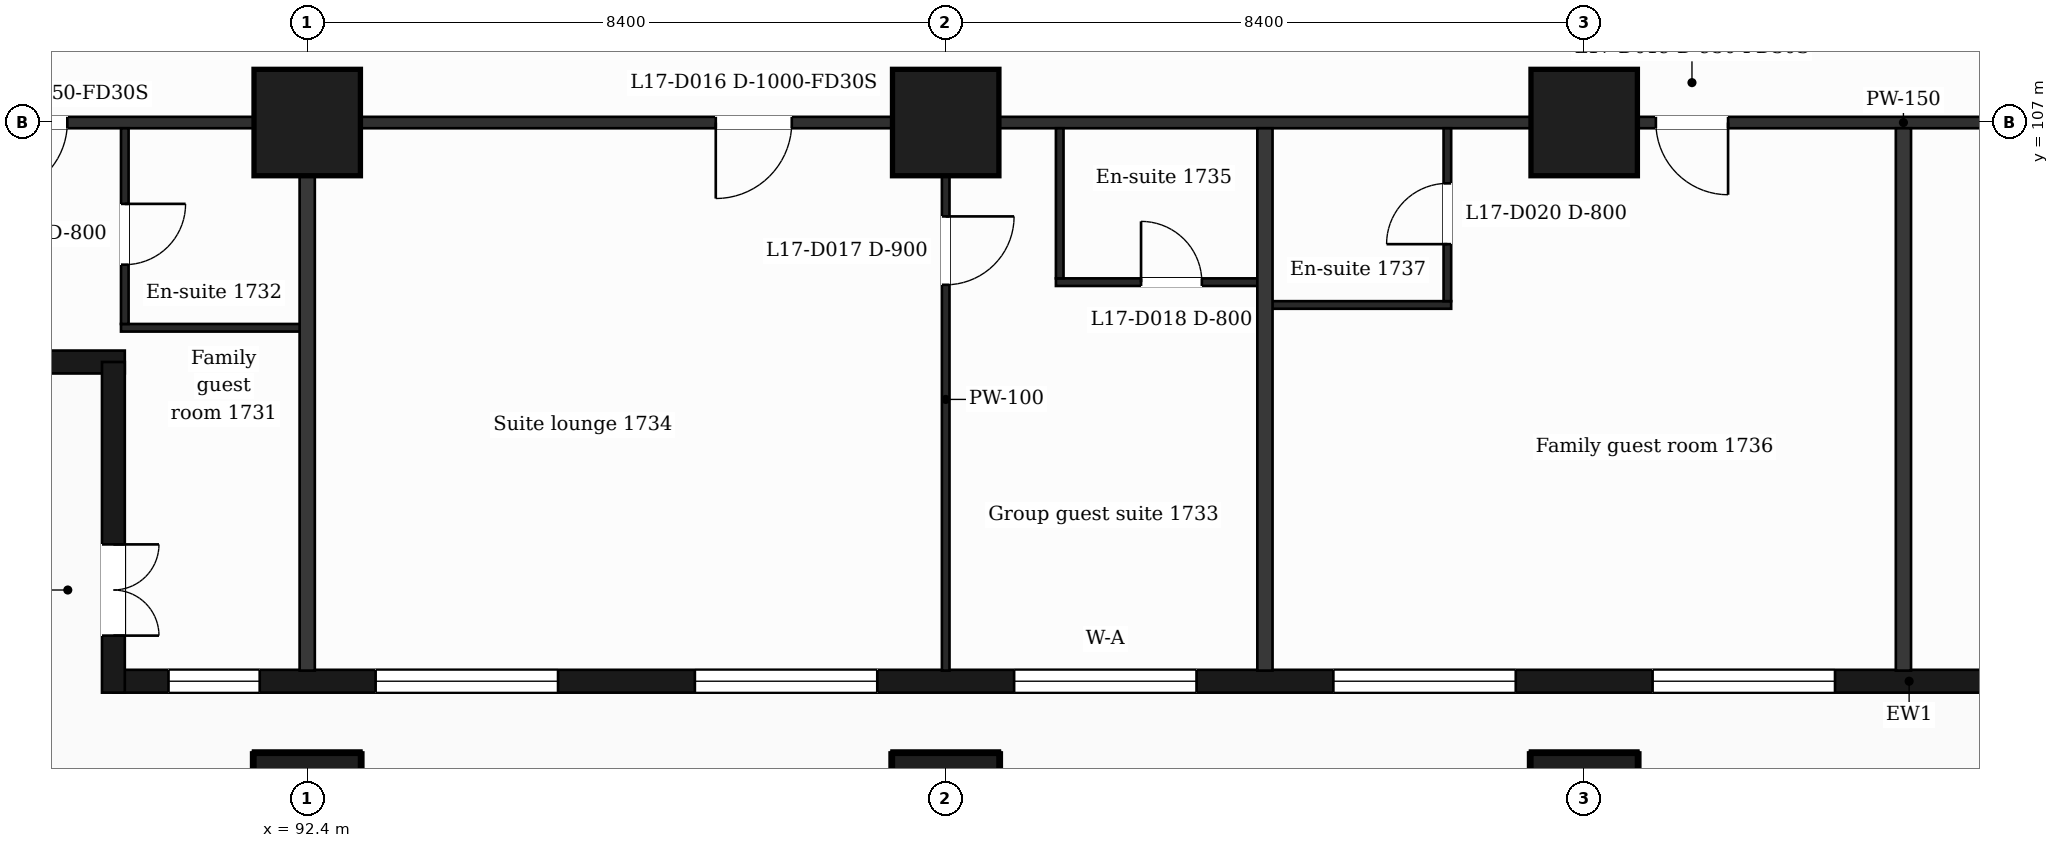
"""IFC4 building model, lengths in metres.
Left out: names, types, materials, properties, quantities, classifications, styles, units other than length and angle.
Written with IfcOpenShell. Run it as: python <this file> out.ifc"""

import sys

from ifc_helpers import new_model, si_unit, direction, frame, frame_2d, origin, origin_2d, place, context, subcontext, project, spatial, rectangle, extrude, element, fill, save


model = new_model("IFC4")
c1 = context("Model", 3, precision=1e-05, world=origin(), true_north=direction((0.0, 1.0)))
c2 = subcontext(c1, "Body", "Model", "MODEL_VIEW")
j1 = project(units=[si_unit("LENGTHUNIT", "METRE"), si_unit("PLANEANGLEUNIT", "RADIAN")], contexts=[c1])
p1 = place(None, origin())
s1 = spatial("IfcSite", under=j1, at=p1, CompositionType="ELEMENT")
p2 = place(p1, origin())
s2 = spatial("IfcBuilding", under=s1, at=p2, CompositionType="ELEMENT")
p3 = place(p2, frame((0.0, 0.0, 77.5)))
s3 = spatial("IfcBuildingStorey", under=s2, at=p3, CompositionType="ELEMENT", Elevation=77.5)
for number, where, z_axis, x_axis in (
    (1, (92.4, 98.0, 0.0), (0.0, 0.0, 1.0), (1.0, 0.0, 0.0)),
    (2, (100.8, 98.0, 0.0), (0.0, 0.0, 1.0), (1.0, 0.0, 0.0)),
    (3, (109.2, 98.0, 0.0), (0.0, 0.0, 1.0), (1.0, 0.0, 0.0)),
    (4, (92.4, 107.0, 0.0), (0.0, 0.0, 1.0), (1.0, 0.0, 0.0)),
    (5, (100.8, 107.0, 0.0), (0.0, 0.0, 1.0), (1.0, 0.0, 0.0)),
    (6, (109.2, 107.0, 0.0), (0.0, 0.0, 1.0), (1.0, 0.0, 0.0)),
):
    element("IfcColumn", number, at=place(p3, frame(where, z_axis=z_axis, x_axis=x_axis)), inside=s3, PredefinedType="COLUMN", context=c2, shape_type="SweptSolid", body=[
        extrude(rectangle(XDim=1.4, YDim=1.4, at=origin_2d()), origin(), (0.0, 0.0, 1.0), 3.5),
    ])
p4 = place(p3, frame((89.85, 99.65, 0.0), z_axis=(0.0, 0.0, 1.0), x_axis=(1.0, 0.0, 0.0)))
e7 = element("IfcWall", 7, at=p4, inside=s3, PredefinedType="SOLIDWALL", context=c2, shape_type="SweptSolid", body=[
    extrude(rectangle(XDim=47.25, YDim=0.3, at=frame_2d((23.625, 0.0))), origin(), (0.0, 0.0, 1.0), 3.0),
])
p5 = place(p4, frame((0.725, 0.0, 0.9)))
e8 = element("IfcOpeningElement", 8, at=p5, cuts=e7, PredefinedType="OPENING", context=c2, shape_type="SweptSolid", body=[
    extrude(rectangle(XDim=1.2, YDim=2.1, at=frame_2d((0.6, 1.05))), frame((0.0, 0.16, 0.0), z_axis=(0.0, -1.0, 0.0), x_axis=(1.0, 0.0, 0.0)), (0.0, 0.0, 1.0), 0.32),
])
p6 = place(p4, frame((3.45, 0.0, 0.9)))
e9 = element("IfcOpeningElement", 9, at=p6, cuts=e7, PredefinedType="OPENING", context=c2, shape_type="SweptSolid", body=[
    extrude(rectangle(XDim=2.4, YDim=2.1, at=frame_2d((1.2, 1.05))), frame((0.0, 0.16, 0.0), z_axis=(0.0, -1.0, 0.0), x_axis=(1.0, 0.0, 0.0)), (0.0, 0.0, 1.0), 0.32),
])
p7 = place(p4, frame((7.65, 0.0, 0.9)))
e10 = element("IfcOpeningElement", 10, at=p7, cuts=e7, PredefinedType="OPENING", context=c2, shape_type="SweptSolid", body=[
    extrude(rectangle(XDim=2.4, YDim=2.1, at=frame_2d((1.2, 1.05))), frame((0.0, 0.16, 0.0), z_axis=(0.0, -1.0, 0.0), x_axis=(1.0, 0.0, 0.0)), (0.0, 0.0, 1.0), 0.32),
])
p8 = place(p4, frame((11.85, 0.0, 0.9)))
e11 = element("IfcOpeningElement", 11, at=p8, cuts=e7, PredefinedType="OPENING", context=c2, shape_type="SweptSolid", body=[
    extrude(rectangle(XDim=2.4, YDim=2.1, at=frame_2d((1.2, 1.05))), frame((0.0, 0.16, 0.0), z_axis=(0.0, -1.0, 0.0), x_axis=(1.0, 0.0, 0.0)), (0.0, 0.0, 1.0), 0.32),
])
p9 = place(p4, frame((16.05, 0.0, 0.9)))
e12 = element("IfcOpeningElement", 12, at=p9, cuts=e7, PredefinedType="OPENING", context=c2, shape_type="SweptSolid", body=[
    extrude(rectangle(XDim=2.4, YDim=2.1, at=frame_2d((1.2, 1.05))), frame((0.0, 0.16, 0.0), z_axis=(0.0, -1.0, 0.0), x_axis=(1.0, 0.0, 0.0)), (0.0, 0.0, 1.0), 0.32),
])
p10 = place(p4, frame((20.25, 0.0, 0.9)))
e13 = element("IfcOpeningElement", 13, at=p10, cuts=e7, PredefinedType="OPENING", context=c2, shape_type="SweptSolid", body=[
    extrude(rectangle(XDim=2.4, YDim=2.1, at=frame_2d((1.2, 1.05))), frame((0.0, 0.16, 0.0), z_axis=(0.0, -1.0, 0.0), x_axis=(1.0, 0.0, 0.0)), (0.0, 0.0, 1.0), 0.32),
])
p11 = place(p4, frame((25.05, 0.0, 0.9)))
e14 = element("IfcOpeningElement", 14, at=p11, cuts=e7, PredefinedType="OPENING", context=c2, shape_type="SweptSolid", body=[
    extrude(rectangle(XDim=1.2, YDim=2.1, at=frame_2d((0.6, 1.05))), frame((0.0, 0.16, 0.0), z_axis=(0.0, -1.0, 0.0), x_axis=(1.0, 0.0, 0.0)), (0.0, 0.0, 1.0), 0.32),
])
p12 = place(p4, frame((29.25, 0.0, 0.9)))
e15 = element("IfcOpeningElement", 15, at=p12, cuts=e7, PredefinedType="OPENING", context=c2, shape_type="SweptSolid", body=[
    extrude(rectangle(XDim=1.2, YDim=2.1, at=frame_2d((0.6, 1.05))), frame((0.0, 0.16, 0.0), z_axis=(0.0, -1.0, 0.0), x_axis=(1.0, 0.0, 0.0)), (0.0, 0.0, 1.0), 0.32),
])
p13 = place(p4, frame((32.55, 0.0, 0.0)))
e16 = element("IfcOpeningElement", 16, at=p13, cuts=e7, PredefinedType="OPENING", context=c2, shape_type="SweptSolid", body=[
    extrude(rectangle(XDim=1.2, YDim=2.4, at=frame_2d((0.6, 1.2))), frame((0.0, 0.16, 0.0), z_axis=(0.0, -1.0, 0.0), x_axis=(1.0, 0.0, 0.0)), (0.0, 0.0, 1.0), 0.32),
])
p14 = place(p4, frame((34.35, 0.0, 0.9)))
e17 = element("IfcOpeningElement", 17, at=p14, cuts=e7, PredefinedType="OPENING", context=c2, shape_type="SweptSolid", body=[
    extrude(rectangle(XDim=1.2, YDim=2.1, at=frame_2d((0.6, 1.05))), frame((0.0, 0.16, 0.0), z_axis=(0.0, -1.0, 0.0), x_axis=(1.0, 0.0, 0.0)), (0.0, 0.0, 1.0), 0.32),
])
p15 = place(p4, frame((37.05, 0.0, 0.9)))
e18 = element("IfcOpeningElement", 18, at=p15, cuts=e7, PredefinedType="OPENING", context=c2, shape_type="SweptSolid", body=[
    extrude(rectangle(XDim=2.4, YDim=2.1, at=frame_2d((1.2, 1.05))), frame((0.0, 0.16, 0.0), z_axis=(0.0, -1.0, 0.0), x_axis=(1.0, 0.0, 0.0)), (0.0, 0.0, 1.0), 0.32),
])
p16 = place(p4, frame((40.95, 0.0, 0.0)))
e19 = element("IfcOpeningElement", 19, at=p16, cuts=e7, PredefinedType="OPENING", context=c2, shape_type="SweptSolid", body=[
    extrude(rectangle(XDim=1.2, YDim=2.4, at=frame_2d((0.6, 1.2))), frame((0.0, 0.16, 0.0), z_axis=(0.0, -1.0, 0.0), x_axis=(1.0, 0.0, 0.0)), (0.0, 0.0, 1.0), 0.32),
])
p17 = place(p4, frame((42.75, 0.0, 0.9)))
e20 = element("IfcOpeningElement", 20, at=p17, cuts=e7, PredefinedType="OPENING", context=c2, shape_type="SweptSolid", body=[
    extrude(rectangle(XDim=1.2, YDim=2.1, at=frame_2d((0.6, 1.05))), frame((0.0, 0.16, 0.0), z_axis=(0.0, -1.0, 0.0), x_axis=(1.0, 0.0, 0.0)), (0.0, 0.0, 1.0), 0.32),
])
p18 = place(p4, frame((45.25, 0.0, 0.9)))
e21 = element("IfcOpeningElement", 21, at=p18, cuts=e7, PredefinedType="OPENING", context=c2, shape_type="SweptSolid", body=[
    extrude(rectangle(XDim=1.2, YDim=2.1, at=frame_2d((0.6, 1.05))), frame((0.0, 0.16, 0.0), z_axis=(0.0, -1.0, 0.0), x_axis=(1.0, 0.0, 0.0)), (0.0, 0.0, 1.0), 0.32),
])
p19 = place(p3, frame((86.452, 103.85, 0.0), z_axis=(0.0, 0.0, 1.0), x_axis=(1.0, 0.0, 0.0)))
e22 = element("IfcWall", 22, at=p19, inside=s3, PredefinedType="SOLIDWALL", context=c2, shape_type="SweptSolid", body=[
    extrude(rectangle(XDim=3.548, YDim=0.3, at=frame_2d((1.774, 0.0))), origin(), (0.0, 0.0, 1.0), 3.0),
])
p20 = place(p3, frame((89.85, 103.85, 0.0), z_axis=(0.0, 0.0, 1.0), x_axis=(0.0, -1.0, 0.0)))
e23 = element("IfcWall", 23, at=p20, inside=s3, PredefinedType="SOLIDWALL", context=c2, shape_type="SweptSolid", body=[
    extrude(rectangle(XDim=4.35, YDim=0.3, at=frame_2d((2.175, 0.0))), origin(), (0.0, 0.0, 1.0), 3.0),
])
p21 = place(p20, frame((2.4, 0.0, 0.0)))
e24 = element("IfcOpeningElement", 24, at=p21, cuts=e23, PredefinedType="OPENING", context=c2, shape_type="SweptSolid", body=[
    extrude(rectangle(XDim=1.2, YDim=2.4, at=frame_2d((0.6, 1.2))), frame((0.0, 0.16, 0.0), z_axis=(0.0, -1.0, 0.0), x_axis=(1.0, 0.0, 0.0)), (0.0, 0.0, 1.0), 0.32),
])
for number, where, z_axis, x_axis in (
    (25, (89.95, 104.3, 0.0), (0.0, 0.0, 1.0), (1.0, 0.0, 0.0)),
    (26, (105.0, 104.6, 0.0), (0.0, 0.0, 1.0), (1.0, 0.0, 0.0)),
):
    element("IfcWall", number, at=place(p3, frame(where, z_axis=z_axis, x_axis=x_axis)), inside=s3, PredefinedType="PARTITIONING", context=c2, shape_type="SweptSolid", body=[
        extrude(rectangle(XDim=2.45, YDim=0.1, at=frame_2d((1.225, 0.0))), origin(), (0.0, 0.0, 1.0), 3.0),
    ])
p22 = place(p3, frame((102.25, 104.9, 0.0), z_axis=(0.0, 0.0, 1.0), x_axis=(1.0, 0.0, 0.0)))
e27 = element("IfcWall", 27, at=p22, inside=s3, PredefinedType="PARTITIONING", context=c2, shape_type="SweptSolid", body=[
    extrude(rectangle(XDim=2.75, YDim=0.1, at=frame_2d((1.375, 0.0))), origin(), (0.0, 0.0, 1.0), 3.0),
])
p23 = place(p22, frame((1.12, 0.0, 0.0)))
e28 = element("IfcOpeningElement", 28, at=p23, cuts=e27, PredefinedType="OPENING", context=c2, shape_type="SweptSolid", body=[
    extrude(rectangle(XDim=0.8, YDim=2.1, at=frame_2d((0.4, 1.05))), frame((0.0, 0.06, 0.0), z_axis=(0.0, -1.0, 0.0), x_axis=(1.0, 0.0, 0.0)), (0.0, 0.0, 1.0), 0.12),
])
p24 = place(p3, frame((87.018, 107.0, 0.0), z_axis=(0.0, 0.0, 1.0), x_axis=(1.0, 0.0, 0.0)))
e29 = element("IfcWall", 29, at=p24, inside=s3, PredefinedType="PARTITIONING", context=c2, shape_type="SweptSolid", body=[
    extrude(rectangle(XDim=52.765, YDim=0.15, at=frame_2d((26.382, 0.0))), origin(), (0.0, 0.0, 1.0), 3.0),
])
p25 = place(p24, frame((1.276, 0.0, 0.0)))
e30 = element("IfcOpeningElement", 30, at=p25, cuts=e29, PredefinedType="OPENING", context=c2, shape_type="SweptSolid", body=[
    extrude(rectangle(XDim=0.95, YDim=2.1, at=frame_2d((0.475, 1.05))), frame((0.0, 0.085, 0.0), z_axis=(0.0, -1.0, 0.0), x_axis=(1.0, 0.0, 0.0)), (0.0, 0.0, 1.0), 0.17),
])
p26 = place(p24, frame((10.757, 0.0, 0.0)))
e31 = element("IfcOpeningElement", 31, at=p26, cuts=e29, PredefinedType="OPENING", context=c2, shape_type="SweptSolid", body=[
    extrude(rectangle(XDim=1.0, YDim=2.1, at=frame_2d((0.5, 1.05))), frame((0.0, 0.085, 0.0), z_axis=(0.0, -1.0, 0.0), x_axis=(1.0, 0.0, 0.0)), (0.0, 0.0, 1.0), 0.17),
])
p27 = place(p24, frame((23.125, 0.0, 0.0)))
e32 = element("IfcOpeningElement", 32, at=p27, cuts=e29, PredefinedType="OPENING", context=c2, shape_type="SweptSolid", body=[
    extrude(rectangle(XDim=0.95, YDim=2.1, at=frame_2d((0.475, 1.05))), frame((0.0, 0.085, 0.0), z_axis=(0.0, -1.0, 0.0), x_axis=(1.0, 0.0, 0.0)), (0.0, 0.0, 1.0), 0.17),
])
p28 = place(p24, frame((31.757, 0.0, 0.0)))
e33 = element("IfcOpeningElement", 33, at=p28, cuts=e29, PredefinedType="OPENING", context=c2, shape_type="SweptSolid", body=[
    extrude(rectangle(XDim=1.0, YDim=2.1, at=frame_2d((0.5, 1.05))), frame((0.0, 0.085, 0.0), z_axis=(0.0, -1.0, 0.0), x_axis=(1.0, 0.0, 0.0)), (0.0, 0.0, 1.0), 0.17),
])
p29 = place(p24, frame((42.819, 0.0, 0.0)))
e34 = element("IfcOpeningElement", 34, at=p29, cuts=e29, PredefinedType="OPENING", context=c2, shape_type="SweptSolid", body=[
    extrude(rectangle(XDim=0.95, YDim=2.1, at=frame_2d((0.475, 1.05))), frame((0.0, 0.085, 0.0), z_axis=(0.0, -1.0, 0.0), x_axis=(1.0, 0.0, 0.0)), (0.0, 0.0, 1.0), 0.17),
])
p30 = place(p24, frame((48.974, 0.0, 0.0)))
e35 = element("IfcOpeningElement", 35, at=p30, cuts=e29, PredefinedType="OPENING", context=c2, shape_type="SweptSolid", body=[
    extrude(rectangle(XDim=0.95, YDim=2.1, at=frame_2d((0.475, 1.05))), frame((0.0, 0.085, 0.0), z_axis=(0.0, -1.0, 0.0), x_axis=(1.0, 0.0, 0.0)), (0.0, 0.0, 1.0), 0.17),
])
p31 = place(p3, frame((90.0, 104.35, 0.0), z_axis=(0.0, 0.0, 1.0), x_axis=(0.0, 1.0, 0.0)))
e36 = element("IfcWall", 36, at=p31, inside=s3, PredefinedType="PARTITIONING", context=c2, shape_type="SweptSolid", body=[
    extrude(rectangle(XDim=2.575, YDim=0.1, at=frame_2d((1.288, 0.0))), origin(), (0.0, 0.0, 1.0), 3.0),
])
p32 = place(p31, frame((0.78, 0.0, 0.0)))
e37 = element("IfcOpeningElement", 37, at=p32, cuts=e36, PredefinedType="OPENING", context=c2, shape_type="SweptSolid", body=[
    extrude(rectangle(XDim=0.8, YDim=2.1, at=frame_2d((0.4, 1.05))), frame((0.0, 0.06, 0.0), z_axis=(0.0, -1.0, 0.0), x_axis=(1.0, 0.0, 0.0)), (0.0, 0.0, 1.0), 0.12),
])
p33 = place(p3, frame((92.4, 99.79, 0.0), z_axis=(0.0, 0.0, 1.0), x_axis=(0.0, 1.0, 0.0)))
e38 = element("IfcWall", 38, at=p33, inside=s3, PredefinedType="PARTITIONING", context=c2, shape_type="SweptSolid", body=[
    extrude(rectangle(XDim=7.135, YDim=0.2, at=frame_2d((3.567, 0.0))), origin(), (0.0, 0.0, 1.0), 3.0),
])
p34 = place(p3, frame((100.8, 99.79, 0.0), z_axis=(0.0, 0.0, 1.0), x_axis=(0.0, 1.0, 0.0)))
e39 = element("IfcWall", 39, at=p34, inside=s3, PredefinedType="PARTITIONING", context=c2, shape_type="SweptSolid", body=[
    extrude(rectangle(XDim=7.135, YDim=0.1, at=frame_2d((3.567, 0.0))), origin(), (0.0, 0.0, 1.0), 3.0),
])
p35 = place(p34, frame((5.075, 0.0, 0.0)))
e40 = element("IfcOpeningElement", 40, at=p35, cuts=e39, PredefinedType="OPENING", context=c2, shape_type="SweptSolid", body=[
    extrude(rectangle(XDim=0.9, YDim=2.1, at=frame_2d((0.45, 1.05))), frame((0.0, 0.06, 0.0), z_axis=(0.0, -1.0, 0.0), x_axis=(1.0, 0.0, 0.0)), (0.0, 0.0, 1.0), 0.12),
])
p36 = place(p3, frame((102.3, 104.95, 0.0), z_axis=(0.0, 0.0, 1.0), x_axis=(0.0, 1.0, 0.0)))
e41 = element("IfcWall", 41, at=p36, inside=s3, PredefinedType="PARTITIONING", context=c2, shape_type="SweptSolid", body=[
    extrude(rectangle(XDim=1.975, YDim=0.1, at=frame_2d((0.988, 0.0))), origin(), (0.0, 0.0, 1.0), 3.0),
])
p37 = place(p3, frame((105.0, 99.79, 0.0), z_axis=(0.0, 0.0, 1.0), x_axis=(0.0, 1.0, 0.0)))
e42 = element("IfcWall", 42, at=p37, inside=s3, PredefinedType="PARTITIONING", context=c2, shape_type="SweptSolid", body=[
    extrude(rectangle(XDim=7.135, YDim=0.2, at=frame_2d((3.567, 0.0))), origin(), (0.0, 0.0, 1.0), 3.0),
])
p38 = place(p3, frame((107.4, 104.65, 0.0), z_axis=(0.0, 0.0, 1.0), x_axis=(0.0, 1.0, 0.0)))
e43 = element("IfcWall", 43, at=p38, inside=s3, PredefinedType="PARTITIONING", context=c2, shape_type="SweptSolid", body=[
    extrude(rectangle(XDim=2.275, YDim=0.1, at=frame_2d((1.138, 0.0))), origin(), (0.0, 0.0, 1.0), 3.0),
])
p39 = place(p38, frame((0.75, 0.0, 0.0)))
e44 = element("IfcOpeningElement", 44, at=p39, cuts=e43, PredefinedType="OPENING", context=c2, shape_type="SweptSolid", body=[
    extrude(rectangle(XDim=0.8, YDim=2.1, at=frame_2d((0.4, 1.05))), frame((0.0, 0.06, 0.0), z_axis=(0.0, -1.0, 0.0), x_axis=(1.0, 0.0, 0.0)), (0.0, 0.0, 1.0), 0.12),
])
p40 = place(p3, frame((113.4, 99.79, 0.0), z_axis=(0.0, 0.0, 1.0), x_axis=(0.0, 1.0, 0.0)))
e45 = element("IfcWall", 45, at=p40, inside=s3, PredefinedType="PARTITIONING", context=c2, shape_type="SweptSolid", body=[
    extrude(rectangle(XDim=7.135, YDim=0.2, at=frame_2d((3.567, 0.0))), origin(), (0.0, 0.0, 1.0), 3.0),
])
p41 = place(p5, origin())
e46 = element("IfcWindow", 46, at=p41, inside=s3, PartitioningType="SINGLE_PANEL", PredefinedType="WINDOW", context=c2, shape_type="SweptSolid", body=[
    extrude(rectangle(XDim=1.2, YDim=2.1, at=frame_2d((0.6, 1.05))), frame((0.0, 0.03, 0.0), z_axis=(0.0, -1.0, 0.0), x_axis=(1.0, 0.0, 0.0)), (0.0, 0.0, 1.0), 0.06),
])
fill(e8, e46)
p42 = place(p6, origin())
e47 = element("IfcWindow", 47, at=p42, inside=s3, PartitioningType="SINGLE_PANEL", PredefinedType="WINDOW", context=c2, shape_type="SweptSolid", body=[
    extrude(rectangle(XDim=2.4, YDim=2.1, at=frame_2d((1.2, 1.05))), frame((0.0, 0.03, 0.0), z_axis=(0.0, -1.0, 0.0), x_axis=(1.0, 0.0, 0.0)), (0.0, 0.0, 1.0), 0.06),
])
fill(e9, e47)
p43 = place(p7, origin())
e48 = element("IfcWindow", 48, at=p43, inside=s3, PartitioningType="SINGLE_PANEL", PredefinedType="WINDOW", context=c2, shape_type="SweptSolid", body=[
    extrude(rectangle(XDim=2.4, YDim=2.1, at=frame_2d((1.2, 1.05))), frame((0.0, 0.03, 0.0), z_axis=(0.0, -1.0, 0.0), x_axis=(1.0, 0.0, 0.0)), (0.0, 0.0, 1.0), 0.06),
])
fill(e10, e48)
p44 = place(p8, origin())
e49 = element("IfcWindow", 49, at=p44, inside=s3, PartitioningType="SINGLE_PANEL", PredefinedType="WINDOW", context=c2, shape_type="SweptSolid", body=[
    extrude(rectangle(XDim=2.4, YDim=2.1, at=frame_2d((1.2, 1.05))), frame((0.0, 0.03, 0.0), z_axis=(0.0, -1.0, 0.0), x_axis=(1.0, 0.0, 0.0)), (0.0, 0.0, 1.0), 0.06),
])
fill(e11, e49)
p45 = place(p9, origin())
e50 = element("IfcWindow", 50, at=p45, inside=s3, PartitioningType="SINGLE_PANEL", PredefinedType="WINDOW", context=c2, shape_type="SweptSolid", body=[
    extrude(rectangle(XDim=2.4, YDim=2.1, at=frame_2d((1.2, 1.05))), frame((0.0, 0.03, 0.0), z_axis=(0.0, -1.0, 0.0), x_axis=(1.0, 0.0, 0.0)), (0.0, 0.0, 1.0), 0.06),
])
fill(e12, e50)
p46 = place(p10, origin())
e51 = element("IfcWindow", 51, at=p46, inside=s3, PartitioningType="SINGLE_PANEL", PredefinedType="WINDOW", context=c2, shape_type="SweptSolid", body=[
    extrude(rectangle(XDim=2.4, YDim=2.1, at=frame_2d((1.2, 1.05))), frame((0.0, 0.03, 0.0), z_axis=(0.0, -1.0, 0.0), x_axis=(1.0, 0.0, 0.0)), (0.0, 0.0, 1.0), 0.06),
])
fill(e13, e51)
p47 = place(p21, origin())
e52 = element("IfcDoor", 52, at=p47, inside=s3, OperationType="DOUBLE_DOOR_SINGLE_SWING", PredefinedType="DOOR", context=c2, shape_type="SweptSolid", body=[
    extrude(rectangle(XDim=1.2, YDim=2.4, at=frame_2d((0.6, 1.2))), frame((0.0, 0.025, 0.0), z_axis=(0.0, -1.0, 0.0), x_axis=(1.0, 0.0, 0.0)), (0.0, 0.0, 1.0), 0.05),
])
fill(e24, e52)
p48 = place(p25, origin())
e53 = element("IfcDoor", 53, at=p48, inside=s3, OperationType="SINGLE_SWING_LEFT", PredefinedType="DOOR", context=c2, shape_type="SweptSolid", body=[
    extrude(rectangle(XDim=0.95, YDim=2.1, at=frame_2d((0.475, 1.05))), frame((0.0, 0.025, 0.0), z_axis=(0.0, -1.0, 0.0), x_axis=(1.0, 0.0, 0.0)), (0.0, 0.0, 1.0), 0.05),
])
fill(e30, e53)
p49 = place(p32, origin())
e54 = element("IfcDoor", 54, at=p49, inside=s3, OperationType="SINGLE_SWING_RIGHT", PredefinedType="DOOR", context=c2, shape_type="SweptSolid", body=[
    extrude(rectangle(XDim=0.8, YDim=2.1, at=frame_2d((0.4, 1.05))), frame((0.0, 0.025, 0.0), z_axis=(0.0, -1.0, 0.0), x_axis=(1.0, 0.0, 0.0)), (0.0, 0.0, 1.0), 0.05),
])
fill(e37, e54)
p50 = place(p26, origin())
e55 = element("IfcDoor", 55, at=p50, inside=s3, OperationType="SINGLE_SWING_LEFT", PredefinedType="DOOR", context=c2, shape_type="SweptSolid", body=[
    extrude(rectangle(XDim=1.0, YDim=2.1, at=frame_2d((0.5, 1.05))), frame((0.0, 0.025, 0.0), z_axis=(0.0, -1.0, 0.0), x_axis=(1.0, 0.0, 0.0)), (0.0, 0.0, 1.0), 0.05),
])
fill(e31, e55)
p51 = place(p35, origin())
e56 = element("IfcDoor", 56, at=p51, inside=s3, OperationType="SINGLE_SWING_RIGHT", PredefinedType="DOOR", context=c2, shape_type="SweptSolid", body=[
    extrude(rectangle(XDim=0.9, YDim=2.1, at=frame_2d((0.45, 1.05))), frame((0.0, 0.025, 0.0), z_axis=(0.0, -1.0, 0.0), x_axis=(1.0, 0.0, 0.0)), (0.0, 0.0, 1.0), 0.05),
])
fill(e40, e56)
p52 = place(p23, origin())
e57 = element("IfcDoor", 57, at=p52, inside=s3, OperationType="SINGLE_SWING_LEFT", PredefinedType="DOOR", context=c2, shape_type="SweptSolid", body=[
    extrude(rectangle(XDim=0.8, YDim=2.1, at=frame_2d((0.4, 1.05))), frame((0.0, 0.025, 0.0), z_axis=(0.0, -1.0, 0.0), x_axis=(1.0, 0.0, 0.0)), (0.0, 0.0, 1.0), 0.05),
])
fill(e28, e57)
p53 = place(p27, origin())
e58 = element("IfcDoor", 58, at=p53, inside=s3, OperationType="SINGLE_SWING_RIGHT", PredefinedType="DOOR", context=c2, shape_type="SweptSolid", body=[
    extrude(rectangle(XDim=0.95, YDim=2.1, at=frame_2d((0.475, 1.05))), frame((0.0, 0.025, 0.0), z_axis=(0.0, -1.0, 0.0), x_axis=(1.0, 0.0, 0.0)), (0.0, 0.0, 1.0), 0.05),
])
fill(e32, e58)
p54 = place(p39, origin())
e59 = element("IfcDoor", 59, at=p54, inside=s3, OperationType="SINGLE_SWING_LEFT", PredefinedType="DOOR", context=c2, shape_type="SweptSolid", body=[
    extrude(rectangle(XDim=0.8, YDim=2.1, at=frame_2d((0.4, 1.05))), frame((0.0, 0.025, 0.0), z_axis=(0.0, -1.0, 0.0), x_axis=(1.0, 0.0, 0.0)), (0.0, 0.0, 1.0), 0.05),
])
fill(e44, e59)
save(model, sys.argv[1])
